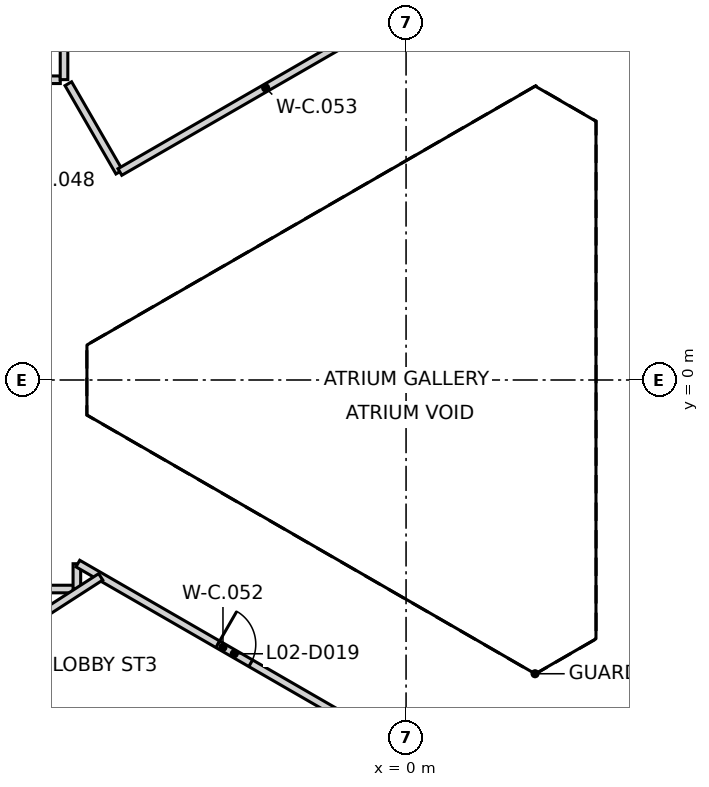
"""IFC4 building model, lengths in metres.
Left out: names, types, materials, properties, quantities, classifications, styles, units other than length and angle.
Written with IfcOpenShell. Run it as: python <this file> out.ifc"""

import sys

from ifc_helpers import new_model, si_unit, direction, frame, frame_2d, origin, place, context, subcontext, project, spatial, rectangle, extrude, element, fill, save


model = new_model("IFC4")
c1 = context("Model", 3, precision=1e-05, world=origin(), true_north=direction((0.0, 1.0)))
c2 = subcontext(c1, "Body", "Model", "MODEL_VIEW")
j1 = project(units=[si_unit("LENGTHUNIT", "METRE"), si_unit("PLANEANGLEUNIT", "RADIAN")], contexts=[c1])
p1 = place(None, origin())
s1 = spatial("IfcSite", under=j1, at=p1, CompositionType="ELEMENT")
p2 = place(p1, origin())
s2 = spatial("IfcBuilding", under=s1, at=p2, CompositionType="ELEMENT")
p3 = place(p2, frame((0.0, 0.0, 14.0)))
s3 = spatial("IfcBuildingStorey", under=s2, at=p3, CompositionType="ELEMENT", Elevation=14.0)
p4 = place(p3, frame((10.42, 6.498, 0.0), z_axis=(0.0, 0.0, 1.0), x_axis=(-0.866021906294, 0.500006057782, 0.0)))
e1 = element("IfcWall", 1, at=p4, inside=s3, PredefinedType="SHEAR", context=c2, shape_type="SweptSolid", body=[
    extrude(rectangle(XDim=11.55, YDim=0.25, at=frame_2d((5.775, 0.0))), origin(), (0.0, 0.0, 1.0), 5.15),
])
p5 = place(p4, frame((10.025, 0.0, 0.0)))
e2 = element("IfcOpeningElement", 2, at=p5, cuts=e1, PredefinedType="OPENING", context=c2, shape_type="SweptSolid", body=[
    extrude(rectangle(XDim=1.2, YDim=2.1, at=frame_2d((0.6, 1.05))), frame((0.0, 0.135, 0.0), z_axis=(0.0, -1.0, 0.0), x_axis=(1.0, 0.0, 0.0)), (0.0, 0.0, 1.0), 0.27),
])
p6 = place(p4, frame((8.725, 0.0, 0.0)))
e3 = element("IfcOpeningElement", 3, at=p6, cuts=e1, PredefinedType="OPENING", context=c2, shape_type="SweptSolid", body=[
    extrude(rectangle(XDim=1.2, YDim=2.1, at=frame_2d((0.6, 1.05))), frame((0.0, 0.135, 0.0), z_axis=(0.0, -1.0, 0.0), x_axis=(1.0, 0.0, 0.0)), (0.0, 0.0, 1.0), 0.27),
])
p7 = place(p3, frame((0.417, -12.273, 0.0), z_axis=(0.0, 0.0, 1.0), x_axis=(0.866021906294, 0.500006057782, 0.0)))
e4 = element("IfcWall", 4, at=p7, inside=s3, PredefinedType="SHEAR", context=c2, shape_type="SweptSolid", body=[
    extrude(rectangle(XDim=11.55, YDim=0.25, at=frame_2d((5.775, 0.0))), origin(), (0.0, 0.0, 1.0), 5.15),
])
p8 = place(p7, frame((10.025, 0.0, 0.0)))
e5 = element("IfcOpeningElement", 5, at=p8, cuts=e4, PredefinedType="OPENING", context=c2, shape_type="SweptSolid", body=[
    extrude(rectangle(XDim=1.2, YDim=2.1, at=frame_2d((0.6, 1.05))), frame((0.0, 0.135, 0.0), z_axis=(0.0, -1.0, 0.0), x_axis=(1.0, 0.0, 0.0)), (0.0, 0.0, 1.0), 0.27),
])
p9 = place(p7, frame((8.725, 0.0, 0.0)))
e6 = element("IfcOpeningElement", 6, at=p9, cuts=e4, PredefinedType="OPENING", context=c2, shape_type="SweptSolid", body=[
    extrude(rectangle(XDim=1.2, YDim=2.1, at=frame_2d((0.6, 1.05))), frame((0.0, 0.135, 0.0), z_axis=(0.0, -1.0, 0.0), x_axis=(1.0, 0.0, 0.0)), (0.0, 0.0, 1.0), 0.27),
])
p10 = place(p3, frame((-16.402, 7.9, 0.0), z_axis=(0.0, 0.0, 1.0), x_axis=(1.0, 0.0, 0.0)))
e7 = element("IfcWall", 7, at=p10, inside=s3, PredefinedType="PARTITIONING", context=c2, shape_type="SweptSolid", body=[
    extrude(rectangle(XDim=7.304, YDim=0.2, at=frame_2d((3.652, 0.0))), origin(), (0.0, 0.0, 1.0), 5.15),
])
p11 = place(p10, frame((2.422, 0.0, 0.0)))
e8 = element("IfcOpeningElement", 8, at=p11, cuts=e7, PredefinedType="OPENING", context=c2, shape_type="SweptSolid", body=[
    extrude(rectangle(XDim=2.4, YDim=2.1, at=frame_2d((1.2, 1.05))), frame((0.0, 0.11, 0.0), z_axis=(0.0, -1.0, 0.0), x_axis=(1.0, 0.0, 0.0)), (0.0, 0.0, 1.0), 0.22),
])
p12 = place(p3, frame((-10.652, -5.5, 0.0), z_axis=(0.0, 0.0, 1.0), x_axis=(1.0, 0.0, 0.0)))
e9 = element("IfcWall", 9, at=p12, inside=s3, PredefinedType="PARTITIONING", context=c2, shape_type="SweptSolid", body=[
    extrude(rectangle(XDim=1.989, YDim=0.2, at=frame_2d((0.995, 0.0))), origin(), (0.0, 0.0, 1.0), 5.15),
])
p13 = place(p3, frame((-8.887, 7.796, 0.0), z_axis=(0.0, 0.0, 1.0), x_axis=(0.499310200174, -0.866423293779, 0.0)))
e10 = element("IfcWall", 10, at=p13, inside=s3, PredefinedType="PARTITIONING", context=c2, shape_type="SweptSolid", body=[
    extrude(rectangle(XDim=2.683, YDim=0.2, at=frame_2d((1.342, 0.0))), origin(), (0.0, 0.0, 1.0), 5.15),
])
p14 = place(p3, frame((-8.662, -5.499, 0.0), z_axis=(0.0, 0.0, 1.0), x_axis=(0.0, 1.0, 0.0)))
e11 = element("IfcWall", 11, at=p14, inside=s3, PredefinedType="PARTITIONING", context=c2, shape_type="SweptSolid", body=[
    extrude(rectangle(XDim=0.665, YDim=0.2, at=frame_2d((0.333, 0.0))), origin(), (0.0, 0.0, 1.0), 5.15),
])
p15 = place(p3, frame((-8.636, -4.83, 0.0), z_axis=(0.0, 0.0, 1.0), x_axis=(0.866235373729, -0.499636144911, 0.0)))
e12 = element("IfcWall", 12, at=p15, inside=s3, PredefinedType="PARTITIONING", context=c2, shape_type="SweptSolid", body=[
    extrude(rectangle(XDim=8.816, YDim=0.2, at=frame_2d((4.408, 0.0))), origin(), (0.0, 0.0, 1.0), 5.15),
])
p16 = place(p15, frame((4.25, 0.0, 0.0)))
e13 = element("IfcOpeningElement", 13, at=p16, cuts=e12, PredefinedType="OPENING", context=c2, shape_type="SweptSolid", body=[
    extrude(rectangle(XDim=1.0, YDim=2.1, at=frame_2d((0.5, 1.05))), frame((0.0, 0.11, 0.0), z_axis=(0.0, -1.0, 0.0), x_axis=(1.0, 0.0, 0.0)), (0.0, 0.0, 1.0), 0.22),
])
p17 = place(p3, frame((-7.53, 5.473, 0.0), z_axis=(0.0, 0.0, 1.0), x_axis=(0.866256262405, 0.499599927786, 0.0)))
e14 = element("IfcWall", 14, at=p17, inside=s3, PredefinedType="PARTITIONING", context=c2, shape_type="SweptSolid", body=[
    extrude(rectangle(XDim=8.855, YDim=0.2, at=frame_2d((4.428, 0.0))), origin(), (0.0, 0.0, 1.0), 5.15),
])
p18 = place(p3, frame((-25.509, -16.444, 0.0), z_axis=(0.0, 0.0, 1.0), x_axis=(0.840504011594, 0.541805321582, 0.0)))
e15 = element("IfcWall", 15, at=p18, inside=s3, PredefinedType="PARTITIONING", context=c2, shape_type="SweptSolid", body=[
    extrude(rectangle(XDim=20.79, YDim=0.2, at=frame_2d((10.395, 0.0))), origin(), (0.0, 0.0, 1.0), 2.75),
])
p19 = place(p3, frame((-9.0, 7.903, 0.0), z_axis=(0.0, 0.0, 1.0), x_axis=(0.0, 1.0, 0.0)))
e16 = element("IfcWall", 16, at=p19, inside=s3, PredefinedType="PARTITIONING", context=c2, shape_type="SweptSolid", body=[
    extrude(rectangle(XDim=3.494, YDim=0.2, at=frame_2d((1.747, 0.0))), origin(), (0.0, 0.0, 1.0), 5.15),
])
p20 = place(p16, frame((1.0, 0.0, 0.0), z_axis=(0.0, 0.0, 1.0), x_axis=(-1.0, 0.0, 0.0)))
e17 = element("IfcDoor", 17, at=p20, inside=s3, OperationType="SINGLE_SWING_LEFT", PredefinedType="DOOR", context=c2, shape_type="SweptSolid", body=[
    extrude(rectangle(XDim=1.0, YDim=2.1, at=frame_2d((0.5, 1.05))), frame((0.0, 0.025, 0.0), z_axis=(0.0, -1.0, 0.0), x_axis=(1.0, 0.0, 0.0)), (0.0, 0.0, 1.0), 0.05),
])
fill(e13, e17)
save(model, sys.argv[1])
